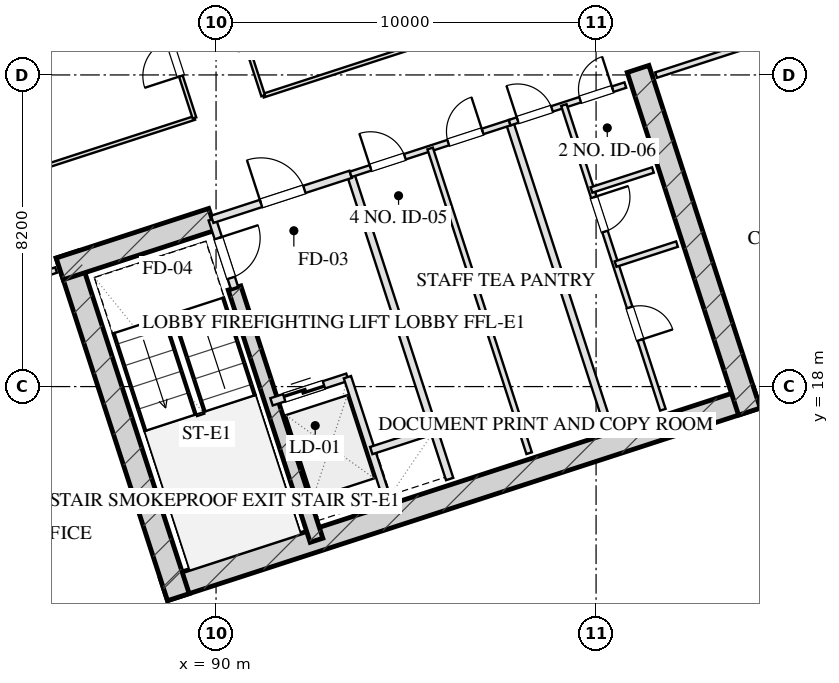
"""IFC4 building model, lengths in metres.
Left out: names, types, materials, properties, quantities, classifications, styles, units other than length and angle.
Written with IfcOpenShell. Run it as: python <this file> out.ifc"""

import sys

from ifc_helpers import new_model, si_unit, direction, frame, frame_2d, origin, place, context, subcontext, project, spatial, rectangle, extrude, element, fill, save


model = new_model("IFC4")
c1 = context("Model", 3, precision=1e-05, world=origin(), true_north=direction((0.0, 1.0)))
c2 = subcontext(c1, "Body", "Model", "MODEL_VIEW")
j1 = project(units=[si_unit("LENGTHUNIT", "METRE"), si_unit("PLANEANGLEUNIT", "RADIAN")], contexts=[c1])
p1 = place(None, origin())
s1 = spatial("IfcSite", under=j1, at=p1, CompositionType="ELEMENT")
p2 = place(p1, origin())
s2 = spatial("IfcBuilding", under=s1, at=p2, CompositionType="ELEMENT")
p3 = place(p2, frame((0.0, 0.0, 113.85)))
s3 = spatial("IfcBuildingStorey", under=s2, at=p3, CompositionType="ELEMENT", Elevation=113.85)
p4 = place(p3, frame((88.63, 12.652, 0.0), z_axis=(0.0, 0.0, 1.0), x_axis=(0.95105714907, 0.309015046886, 0.0)))
e1 = element("IfcWall", 1, at=p4, inside=s3, PredefinedType="SHEAR", context=c2, shape_type="SweptSolid", body=[
    extrude(rectangle(XDim=16.4, YDim=0.6, at=frame_2d((8.2, 0.0))), origin(), (0.0, 0.0, 1.0), 3.45),
])
p5 = place(p3, frame((86.078, 21.475, 0.0), z_axis=(0.0, 0.0, 1.0), x_axis=(0.309017938678, -0.951056209472, 0.0)))
e2 = element("IfcWall", 2, at=p5, inside=s3, PredefinedType="SHEAR", context=c2, shape_type="SweptSolid", body=[
    extrude(rectangle(XDim=9.48, YDim=0.6, at=frame_2d((4.74, 0.0))), origin(), (0.0, 0.0, 1.0), 3.45),
])
p6 = place(p3, frame((101.105, 26.358, 0.0), z_axis=(0.0, 0.0, 1.0), x_axis=(0.309010370028, -0.95105866865, 0.0)))
e3 = element("IfcWall", 3, at=p6, inside=s3, PredefinedType="SHEAR", context=c2, shape_type="SweptSolid", body=[
    extrude(rectangle(XDim=9.48, YDim=0.6, at=frame_2d((4.74, 0.0))), origin(), (0.0, 0.0, 1.0), 3.45),
])
p7 = place(p3, frame((90.486, 20.594, 0.0), z_axis=(0.0, 0.0, 1.0), x_axis=(0.309020428229, -0.951055400562, 0.0)))
e4 = element("IfcWall", 4, at=p7, inside=s3, PredefinedType="SHEAR", context=c2, shape_type="SweptSolid", body=[
    extrude(rectangle(XDim=6.98, YDim=0.35, at=frame_2d((3.49, 0.0))), origin(), (0.0, 0.0, 1.0), 3.45),
])
p8 = place(p3, frame((85.886, 21.097, 0.0), z_axis=(0.0, 0.0, 1.0), x_axis=(0.951068073652, 0.308981422225, 0.0)))
e5 = element("IfcWall", 5, at=p8, inside=s3, PredefinedType="SHEAR", context=c2, shape_type="SweptSolid", body=[
    extrude(rectangle(XDim=4.22, YDim=0.6, at=frame_2d((2.11, 0.0))), origin(), (0.0, 0.0, 1.0), 3.45),
])
p9 = place(p3, frame((99.284, 61.41, 0.0), z_axis=(0.0, 0.0, 1.0), x_axis=(0.309017542002, -0.95105633836, 0.0)))
e6 = element("IfcWall", 6, at=p9, inside=s3, PredefinedType="SOLIDWALL", context=c2, shape_type="SweptSolid", body=[
    extrude(rectangle(XDim=46.4, YDim=0.4, at=frame_2d((23.2, 0.0))), origin(), (0.0, 0.0, 1.0), 2.61),
])
p10 = place(p9, frame((28.4, 0.0, 0.75)))
e7 = element("IfcOpeningElement", 7, at=p10, cuts=e6, PredefinedType="OPENING", context=c2, shape_type="SweptSolid", body=[
    extrude(rectangle(XDim=2.4, YDim=1.46, at=frame_2d((1.2, 0.73))), frame((0.0, 0.21, 0.0), z_axis=(0.0, -1.0, 0.0), x_axis=(1.0, 0.0, 0.0)), (0.0, 0.0, 1.0), 0.42),
])
p11 = place(p9, frame((16.85, 0.0, 0.0)))
e8 = element("IfcOpeningElement", 8, at=p11, cuts=e6, PredefinedType="OPENING", context=c2, shape_type="SweptSolid", body=[
    extrude(rectangle(XDim=1.1, YDim=2.15, at=frame_2d((0.55, 1.075))), frame((0.0, 0.21, 0.0), z_axis=(0.0, -1.0, 0.0), x_axis=(1.0, 0.0, 0.0)), (0.0, 0.0, 1.0), 0.42),
])
p12 = place(p3, frame((111.953, 14.005, 0.0), z_axis=(0.0, 0.0, 1.0), x_axis=(-0.95105505922, -0.309021478754, 0.0)))
e9 = element("IfcWall", 9, at=p12, inside=s3, PredefinedType="SOLIDWALL", context=c2, shape_type="SweptSolid", body=[
    extrude(rectangle(XDim=29.4, YDim=0.4, at=frame_2d((14.7, 0.0))), origin(), (0.0, 0.0, 1.0), 2.61),
])
p13 = place(p3, frame((89.899, 22.401, 0.0), z_axis=(0.0, 0.0, 1.0), x_axis=(0.308932062672, -0.951084108086, 0.0)))
e10 = element("IfcWall", 10, at=p13, inside=s3, PredefinedType="PARTITIONING", context=c2, shape_type="SweptSolid", body=[
    extrude(rectangle(XDim=1.9, YDim=0.2, at=frame_2d((0.95, 0.0))), origin(), (0.0, 0.0, 1.0), 3.175),
])
p14 = place(p13, frame((0.52, 0.0, 0.0)))
e11 = element("IfcOpeningElement", 11, at=p14, cuts=e10, PredefinedType="OPENING", context=c2, shape_type="SweptSolid", body=[
    extrude(rectangle(XDim=1.1, YDim=2.05, at=frame_2d((0.55, 1.025))), frame((0.0, 0.11, 0.0), z_axis=(0.0, -1.0, 0.0), x_axis=(1.0, 0.0, 0.0)), (0.0, 0.0, 1.0), 0.22),
])
p15 = place(p3, frame((93.542, 23.585, 0.0), z_axis=(0.0, 0.0, 1.0), x_axis=(0.309042196757, -0.951048327176, 0.0)))
e12 = element("IfcWall", 12, at=p15, inside=s3, PredefinedType="PARTITIONING", context=c2, shape_type="SweptSolid", body=[
    extrude(rectangle(XDim=8.43, YDim=0.2, at=frame_2d((4.215, 0.0))), origin(), (0.0, 0.0, 1.0), 3.175),
])
p16 = place(p3, frame((89.899, 22.401, 0.0), z_axis=(0.0, 0.0, 1.0), x_axis=(0.951046716504, 0.309047153403, 0.0)))
e13 = element("IfcWall", 13, at=p16, inside=s3, PredefinedType="PARTITIONING", context=c2, shape_type="SweptSolid", body=[
    extrude(rectangle(XDim=3.83, YDim=0.2, at=frame_2d((1.915, 0.0))), origin(), (0.0, 0.0, 1.0), 3.175),
])
p17 = place(p16, frame((1.35, 0.0, 0.0)))
e14 = element("IfcOpeningElement", 14, at=p17, cuts=e13, PredefinedType="OPENING", context=c2, shape_type="SweptSolid", body=[
    extrude(rectangle(XDim=1.2, YDim=2.05, at=frame_2d((0.6, 1.025))), frame((0.0, 0.11, 0.0), z_axis=(0.0, -1.0, 0.0), x_axis=(1.0, 0.0, 0.0)), (0.0, 0.0, 1.0), 0.22),
])
p18 = place(p3, frame((91.46, 17.598, 0.0), z_axis=(0.0, 0.0, 1.0), x_axis=(0.951062257173, 0.308999325213, 0.0)))
e15 = element("IfcWall", 15, at=p18, inside=s3, PredefinedType="PARTITIONING", context=c2, shape_type="SweptSolid", body=[
    extrude(rectangle(XDim=2.1, YDim=0.2, at=frame_2d((1.05, 0.0))), origin(), (0.0, 0.0, 1.0), 3.175),
])
p19 = place(p18, frame((0.35, 0.0, 0.0)))
e16 = element("IfcOpeningElement", 16, at=p19, cuts=e15, PredefinedType="OPENING", context=c2, shape_type="SweptSolid", body=[
    extrude(rectangle(XDim=1.1, YDim=2.05, at=frame_2d((0.55, 1.025))), frame((0.0, 0.11, 0.0), z_axis=(0.0, -1.0, 0.0), x_axis=(1.0, 0.0, 0.0)), (0.0, 0.0, 1.0), 0.22),
])
p20 = place(p3, frame((93.457, 18.247, 0.0), z_axis=(0.0, 0.0, 1.0), x_axis=(0.3089935693, -0.951064127245, 0.0)))
e17 = element("IfcWall", 17, at=p20, inside=s3, PredefinedType="PARTITIONING", context=c2, shape_type="SweptSolid", body=[
    extrude(rectangle(XDim=3.7, YDim=0.2, at=frame_2d((1.85, 0.0))), origin(), (0.0, 0.0, 1.0), 3.175),
])
p21 = place(p3, frame((94.084, 16.317, 0.0), z_axis=(0.0, 0.0, 1.0), x_axis=(0.951041328149, 0.309063734775, 0.0)))
e18 = element("IfcWall", 18, at=p21, inside=s3, PredefinedType="PARTITIONING", context=c2, shape_type="SweptSolid", body=[
    extrude(rectangle(XDim=1.73, YDim=0.2, at=frame_2d((0.865, 0.0))), origin(), (0.0, 0.0, 1.0), 3.175),
])
p22 = place(p3, frame((97.727, 24.944, 0.0), z_axis=(0.0, 0.0, 1.0), x_axis=(0.309016001439, -0.951056838919, 0.0)))
e19 = element("IfcWall", 19, at=p22, inside=s3, PredefinedType="PARTITIONING", context=c2, shape_type="SweptSolid", body=[
    extrude(rectangle(XDim=8.43, YDim=0.2, at=frame_2d((4.215, 0.0))), origin(), (0.0, 0.0, 1.0), 3.175),
])
p23 = place(p3, frame((93.542, 23.585, 0.0), z_axis=(0.0, 0.0, 1.0), x_axis=(0.951063829732, 0.308994485023, 0.0)))
e20 = element("IfcWall", 20, at=p23, inside=s3, PredefinedType="PARTITIONING", context=c2, shape_type="SweptSolid", body=[
    extrude(rectangle(XDim=4.4, YDim=0.15, at=frame_2d((2.2, 0.0))), origin(), (0.0, 0.0, 1.0), 3.175),
])
p24 = place(p23, frame((0.55, 0.0, 0.0)))
e21 = element("IfcOpeningElement", 21, at=p24, cuts=e20, PredefinedType="OPENING", context=c2, shape_type="SweptSolid", body=[
    extrude(rectangle(XDim=0.95, YDim=2.05, at=frame_2d((0.475, 1.025))), frame((0.0, 0.085, 0.0), z_axis=(0.0, -1.0, 0.0), x_axis=(1.0, 0.0, 0.0)), (0.0, 0.0, 1.0), 0.17),
])
p25 = place(p23, frame((2.7, 0.0, 0.0)))
e22 = element("IfcOpeningElement", 22, at=p25, cuts=e20, PredefinedType="OPENING", context=c2, shape_type="SweptSolid", body=[
    extrude(rectangle(XDim=0.95, YDim=2.05, at=frame_2d((0.475, 1.025))), frame((0.0, 0.085, 0.0), z_axis=(0.0, -1.0, 0.0), x_axis=(1.0, 0.0, 0.0)), (0.0, 0.0, 1.0), 0.17),
])
p26 = place(p3, frame((95.634, 24.265, 0.0), z_axis=(0.0, 0.0, 1.0), x_axis=(0.309007490203, -0.951059604335, 0.0)))
e23 = element("IfcWall", 23, at=p26, inside=s3, PredefinedType="PARTITIONING", context=c2, shape_type="SweptSolid", body=[
    extrude(rectangle(XDim=8.43, YDim=0.15, at=frame_2d((4.215, 0.0))), origin(), (0.0, 0.0, 1.0), 3.175),
])
p27 = place(p3, frame((97.727, 24.944, 0.0), z_axis=(0.0, 0.0, 1.0), x_axis=(0.951036872128, 0.309077446369, 0.0)))
e24 = element("IfcWall", 24, at=p27, inside=s3, PredefinedType="PARTITIONING", context=c2, shape_type="SweptSolid", body=[
    extrude(rectangle(XDim=3.2, YDim=0.15, at=frame_2d((1.6, 0.0))), origin(), (0.0, 0.0, 1.0), 3.175),
])
p28 = place(p27, frame((0.22, 0.0, 0.0)))
e25 = element("IfcOpeningElement", 25, at=p28, cuts=e24, PredefinedType="OPENING", context=c2, shape_type="SweptSolid", body=[
    extrude(rectangle(XDim=0.95, YDim=2.05, at=frame_2d((0.475, 1.025))), frame((0.0, 0.085, 0.0), z_axis=(0.0, -1.0, 0.0), x_axis=(1.0, 0.0, 0.0)), (0.0, 0.0, 1.0), 0.17),
])
p29 = place(p27, frame((1.95, 0.0, 0.0)))
e26 = element("IfcOpeningElement", 26, at=p29, cuts=e24, PredefinedType="OPENING", context=c2, shape_type="SweptSolid", body=[
    extrude(rectangle(XDim=0.9, YDim=2.05, at=frame_2d((0.45, 1.025))), frame((0.0, 0.085, 0.0), z_axis=(0.0, -1.0, 0.0), x_axis=(1.0, 0.0, 0.0)), (0.0, 0.0, 1.0), 0.17),
])
p30 = place(p3, frame((99.153, 25.408, 0.0), z_axis=(0.0, 0.0, 1.0), x_axis=(0.309016001439, -0.951056838919, 0.0)))
e27 = element("IfcWall", 27, at=p30, inside=s3, PredefinedType="PARTITIONING", context=c2, shape_type="SweptSolid", body=[
    extrude(rectangle(XDim=8.43, YDim=0.15, at=frame_2d((4.215, 0.0))), origin(), (0.0, 0.0, 1.0), 3.175),
])
p31 = place(p30, frame((2.55, 0.0, 0.0)))
e28 = element("IfcOpeningElement", 28, at=p31, cuts=e27, PredefinedType="OPENING", context=c2, shape_type="SweptSolid", body=[
    extrude(rectangle(XDim=0.95, YDim=2.05, at=frame_2d((0.475, 1.025))), frame((0.0, 0.085, 0.0), z_axis=(0.0, -1.0, 0.0), x_axis=(1.0, 0.0, 0.0)), (0.0, 0.0, 1.0), 0.17),
])
p32 = place(p30, frame((5.6, 0.0, 0.0)))
e29 = element("IfcOpeningElement", 29, at=p32, cuts=e27, PredefinedType="OPENING", context=c2, shape_type="SweptSolid", body=[
    extrude(rectangle(XDim=0.9, YDim=2.05, at=frame_2d((0.45, 1.025))), frame((0.0, 0.085, 0.0), z_axis=(0.0, -1.0, 0.0), x_axis=(1.0, 0.0, 0.0)), (0.0, 0.0, 1.0), 0.17),
])
for number, where, z_axis, x_axis in (
    (30, (100.513, 21.223, 0.0), (0.0, 0.0, 1.0), (0.951, 0.309, 0.0)),
    (31, (99.879, 23.173, 0.0), (0.0, 0.0, 1.0), (0.951, 0.309, 0.0)),
):
    element("IfcWall", number, at=place(p3, frame(where, z_axis=z_axis, x_axis=x_axis)), inside=s3, PredefinedType="PARTITIONING", context=c2, shape_type="SweptSolid", body=[
        extrude(rectangle(XDim=1.7, YDim=0.15, at=frame_2d((0.85, 0.0))), origin(), (0.0, 0.0, 1.0), 3.175),
    ])
p33 = place(p3, frame((77.136, 18.254, 0.0), z_axis=(0.0, 0.0, 1.0), x_axis=(0.951057133767, 0.309015093986, 0.0)))
e32 = element("IfcWall", 32, at=p33, inside=s3, PredefinedType="PARTITIONING", context=c2, shape_type="SweptSolid", body=[
    extrude(rectangle(XDim=9.1, YDim=0.15, at=frame_2d((4.55, 0.0))), origin(), (0.0, 0.0, 1.0), 3.175),
])
p34 = place(p33, frame((3.822, 0.0, 0.0)))
e33 = element("IfcOpeningElement", 33, at=p34, cuts=e32, PredefinedType="OPENING", context=c2, shape_type="SweptSolid", body=[
    extrude(rectangle(XDim=1.0, YDim=2.05, at=frame_2d((0.5, 1.025))), frame((0.0, 0.085, 0.0), z_axis=(0.0, -1.0, 0.0), x_axis=(1.0, 0.0, 0.0)), (0.0, 0.0, 1.0), 0.17),
])
p35 = place(p3, frame((101.578, 26.196, 0.0), z_axis=(0.0, 0.0, 1.0), x_axis=(0.951062770994, 0.308997743729, 0.0)))
e34 = element("IfcWall", 34, at=p35, inside=s3, PredefinedType="PARTITIONING", context=c2, shape_type="SweptSolid", body=[
    extrude(rectangle(XDim=8.5, YDim=0.15, at=frame_2d((4.25, 0.0))), origin(), (0.0, 0.0, 1.0), 3.175),
])
p36 = place(p35, frame((3.57, 0.0, 0.0)))
e35 = element("IfcOpeningElement", 35, at=p36, cuts=e34, PredefinedType="OPENING", context=c2, shape_type="SweptSolid", body=[
    extrude(rectangle(XDim=1.0, YDim=2.05, at=frame_2d((0.5, 1.025))), frame((0.0, 0.085, 0.0), z_axis=(0.0, -1.0, 0.0), x_axis=(1.0, 0.0, 0.0)), (0.0, 0.0, 1.0), 0.17),
])
p37 = place(p3, frame((76.308, 20.803, 0.0), z_axis=(0.0, 0.0, 1.0), x_axis=(0.951058377365, 0.309011266531, 0.0)))
e36 = element("IfcWall", 36, at=p37, inside=s3, PredefinedType="MOVABLE", context=c2, shape_type="SweptSolid", body=[
    extrude(rectangle(XDim=13.8, YDim=0.1, at=frame_2d((6.9, 0.0))), origin(), (0.0, 0.0, 1.0), 3.175),
])
p38 = place(p3, frame((91.24, 25.655, 0.0), z_axis=(0.0, 0.0, 1.0), x_axis=(0.951060182336, 0.309005711233, 0.0)))
e37 = element("IfcWall", 37, at=p38, inside=s3, PredefinedType="MOVABLE", context=c2, shape_type="SweptSolid", body=[
    extrude(rectangle(XDim=7.9, YDim=0.1, at=frame_2d((3.95, 0.0))), origin(), (0.0, 0.0, 1.0), 3.175),
])
p39 = place(p3, frame((89.433, 25.067, 0.0), z_axis=(0.0, 0.0, 1.0), x_axis=(-0.30901773025, 0.951056277195, 0.0)))
e38 = element("IfcWall", 38, at=p39, inside=s3, PredefinedType="MOVABLE", context=c2, shape_type="SweptSolid", body=[
    extrude(rectangle(XDim=16.64, YDim=0.1, at=frame_2d((8.32, 0.0))), origin(), (0.0, 0.0, 1.0), 3.175),
])
p40 = place(p39, frame((1.16, 0.0, 0.0)))
e39 = element("IfcOpeningElement", 39, at=p40, cuts=e38, PredefinedType="OPENING", context=c2, shape_type="SweptSolid", body=[
    extrude(rectangle(XDim=1.0, YDim=2.05, at=frame_2d((0.5, 1.025))), frame((0.0, 0.06, 0.0), z_axis=(0.0, -1.0, 0.0), x_axis=(1.0, 0.0, 0.0)), (0.0, 0.0, 1.0), 0.12),
])
p41 = place(p39, frame((6.16, 0.0, 0.0)))
e40 = element("IfcOpeningElement", 40, at=p41, cuts=e38, PredefinedType="OPENING", context=c2, shape_type="SweptSolid", body=[
    extrude(rectangle(XDim=1.0, YDim=2.05, at=frame_2d((0.5, 1.025))), frame((0.0, 0.06, 0.0), z_axis=(0.0, -1.0, 0.0), x_axis=(1.0, 0.0, 0.0)), (0.0, 0.0, 1.0), 0.12),
])
p42 = place(p39, frame((10.16, 0.0, 0.0)))
e41 = element("IfcOpeningElement", 41, at=p42, cuts=e38, PredefinedType="OPENING", context=c2, shape_type="SweptSolid", body=[
    extrude(rectangle(XDim=1.0, YDim=2.05, at=frame_2d((0.5, 1.025))), frame((0.0, 0.06, 0.0), z_axis=(0.0, -1.0, 0.0), x_axis=(1.0, 0.0, 0.0)), (0.0, 0.0, 1.0), 0.12),
])
p43 = place(p39, frame((14.48, 0.0, 0.0)))
e42 = element("IfcOpeningElement", 42, at=p43, cuts=e38, PredefinedType="OPENING", context=c2, shape_type="SweptSolid", body=[
    extrude(rectangle(XDim=1.0, YDim=2.05, at=frame_2d((0.5, 1.025))), frame((0.0, 0.06, 0.0), z_axis=(0.0, -1.0, 0.0), x_axis=(1.0, 0.0, 0.0)), (0.0, 0.0, 1.0), 0.12),
])
p44 = place(p3, frame((91.24, 25.655, 0.0), z_axis=(0.0, 0.0, 1.0), x_axis=(-0.30901773025, 0.951056277195, 0.0)))
e43 = element("IfcWall", 43, at=p44, inside=s3, PredefinedType="MOVABLE", context=c2, shape_type="SweptSolid", body=[
    extrude(rectangle(XDim=16.64, YDim=0.1, at=frame_2d((8.32, 0.0))), origin(), (0.0, 0.0, 1.0), 3.175),
])
p45 = place(p44, frame((3.204, 0.0, 0.0)))
e44 = element("IfcOpeningElement", 44, at=p45, cuts=e43, PredefinedType="OPENING", context=c2, shape_type="SweptSolid", body=[
    extrude(rectangle(XDim=1.1, YDim=2.05, at=frame_2d((0.55, 1.025))), frame((0.0, 0.06, 0.0), z_axis=(0.0, -1.0, 0.0), x_axis=(1.0, 0.0, 0.0)), (0.0, 0.0, 1.0), 0.12),
])
p46 = place(p44, frame((11.404, 0.0, 0.0)))
e45 = element("IfcOpeningElement", 45, at=p46, cuts=e43, PredefinedType="OPENING", context=c2, shape_type="SweptSolid", body=[
    extrude(rectangle(XDim=1.1, YDim=2.05, at=frame_2d((0.55, 1.025))), frame((0.0, 0.06, 0.0), z_axis=(0.0, -1.0, 0.0), x_axis=(1.0, 0.0, 0.0)), (0.0, 0.0, 1.0), 0.12),
])
p47 = place(p3, frame((74.973, 24.912, 0.0), z_axis=(0.0, 0.0, 1.0), x_axis=(0.951058377365, 0.309011266531, 0.0)))
e46 = element("IfcWall", 46, at=p47, inside=s3, PredefinedType="MOVABLE", context=c2, shape_type="SweptSolid", body=[
    extrude(rectangle(XDim=13.8, YDim=0.1, at=frame_2d((6.9, 0.0))), origin(), (0.0, 0.0, 1.0), 3.175),
])
p48 = place(p14, origin())
e47 = element("IfcDoor", 47, at=p48, inside=s3, OperationType="SINGLE_SWING_LEFT", PredefinedType="DOOR", context=c2, shape_type="SweptSolid", body=[
    extrude(rectangle(XDim=1.1, YDim=2.05, at=frame_2d((0.55, 1.025))), frame((0.0, 0.025, 0.0), z_axis=(0.0, -1.0, 0.0), x_axis=(1.0, 0.0, 0.0)), (0.0, 0.0, 1.0), 0.05),
])
fill(e11, e47)
p49 = place(p17, origin())
e48 = element("IfcDoor", 48, at=p49, inside=s3, OperationType="SINGLE_SWING_LEFT", PredefinedType="DOOR", context=c2, shape_type="SweptSolid", body=[
    extrude(rectangle(XDim=1.2, YDim=2.05, at=frame_2d((0.6, 1.025))), frame((0.0, 0.025, 0.0), z_axis=(0.0, -1.0, 0.0), x_axis=(1.0, 0.0, 0.0)), (0.0, 0.0, 1.0), 0.05),
])
fill(e14, e48)
p50 = place(p19, origin())
e49 = element("IfcDoor", 49, at=p50, inside=s3, OperationType="DOUBLE_DOOR_SLIDING", PredefinedType="DOOR", context=c2, shape_type="SweptSolid", body=[
    extrude(rectangle(XDim=1.1, YDim=2.05, at=frame_2d((0.55, 1.025))), frame((0.0, 0.025, 0.0), z_axis=(0.0, -1.0, 0.0), x_axis=(1.0, 0.0, 0.0)), (0.0, 0.0, 1.0), 0.05),
])
fill(e16, e49)
p51 = place(p24, origin())
e50 = element("IfcDoor", 50, at=p51, inside=s3, OperationType="SINGLE_SWING_LEFT", PredefinedType="DOOR", context=c2, shape_type="SweptSolid", body=[
    extrude(rectangle(XDim=0.95, YDim=2.05, at=frame_2d((0.475, 1.025))), frame((0.0, 0.025, 0.0), z_axis=(0.0, -1.0, 0.0), x_axis=(1.0, 0.0, 0.0)), (0.0, 0.0, 1.0), 0.05),
])
fill(e21, e50)
p52 = place(p25, origin())
e51 = element("IfcDoor", 51, at=p52, inside=s3, OperationType="SINGLE_SWING_RIGHT", PredefinedType="DOOR", context=c2, shape_type="SweptSolid", body=[
    extrude(rectangle(XDim=0.95, YDim=2.05, at=frame_2d((0.475, 1.025))), frame((0.0, 0.025, 0.0), z_axis=(0.0, -1.0, 0.0), x_axis=(1.0, 0.0, 0.0)), (0.0, 0.0, 1.0), 0.05),
])
fill(e22, e51)
p53 = place(p28, origin())
e52 = element("IfcDoor", 52, at=p53, inside=s3, OperationType="SINGLE_SWING_LEFT", PredefinedType="DOOR", context=c2, shape_type="SweptSolid", body=[
    extrude(rectangle(XDim=0.95, YDim=2.05, at=frame_2d((0.475, 1.025))), frame((0.0, 0.025, 0.0), z_axis=(0.0, -1.0, 0.0), x_axis=(1.0, 0.0, 0.0)), (0.0, 0.0, 1.0), 0.05),
])
fill(e25, e52)
p54 = place(p29, origin())
e53 = element("IfcDoor", 53, at=p54, inside=s3, OperationType="SINGLE_SWING_RIGHT", PredefinedType="DOOR", context=c2, shape_type="SweptSolid", body=[
    extrude(rectangle(XDim=0.9, YDim=2.05, at=frame_2d((0.45, 1.025))), frame((0.0, 0.025, 0.0), z_axis=(0.0, -1.0, 0.0), x_axis=(1.0, 0.0, 0.0)), (0.0, 0.0, 1.0), 0.05),
])
fill(e26, e53)
p55 = place(p31, origin())
e54 = element("IfcDoor", 54, at=p55, inside=s3, OperationType="SINGLE_SWING_LEFT", PredefinedType="DOOR", context=c2, shape_type="SweptSolid", body=[
    extrude(rectangle(XDim=0.95, YDim=2.05, at=frame_2d((0.475, 1.025))), frame((0.0, 0.025, 0.0), z_axis=(0.0, -1.0, 0.0), x_axis=(1.0, 0.0, 0.0)), (0.0, 0.0, 1.0), 0.05),
])
fill(e28, e54)
p56 = place(p32, origin())
e55 = element("IfcDoor", 55, at=p56, inside=s3, OperationType="SINGLE_SWING_RIGHT", PredefinedType="DOOR", context=c2, shape_type="SweptSolid", body=[
    extrude(rectangle(XDim=0.9, YDim=2.05, at=frame_2d((0.45, 1.025))), frame((0.0, 0.025, 0.0), z_axis=(0.0, -1.0, 0.0), x_axis=(1.0, 0.0, 0.0)), (0.0, 0.0, 1.0), 0.05),
])
fill(e29, e55)
p57 = place(p40, origin())
e56 = element("IfcDoor", 56, at=p57, inside=s3, OperationType="SINGLE_SWING_LEFT", PredefinedType="DOOR", context=c2, shape_type="SweptSolid", body=[
    extrude(rectangle(XDim=1.0, YDim=2.05, at=frame_2d((0.5, 1.025))), frame((0.0, 0.025, 0.0), z_axis=(0.0, -1.0, 0.0), x_axis=(1.0, 0.0, 0.0)), (0.0, 0.0, 1.0), 0.05),
])
fill(e39, e56)
save(model, sys.argv[1])
